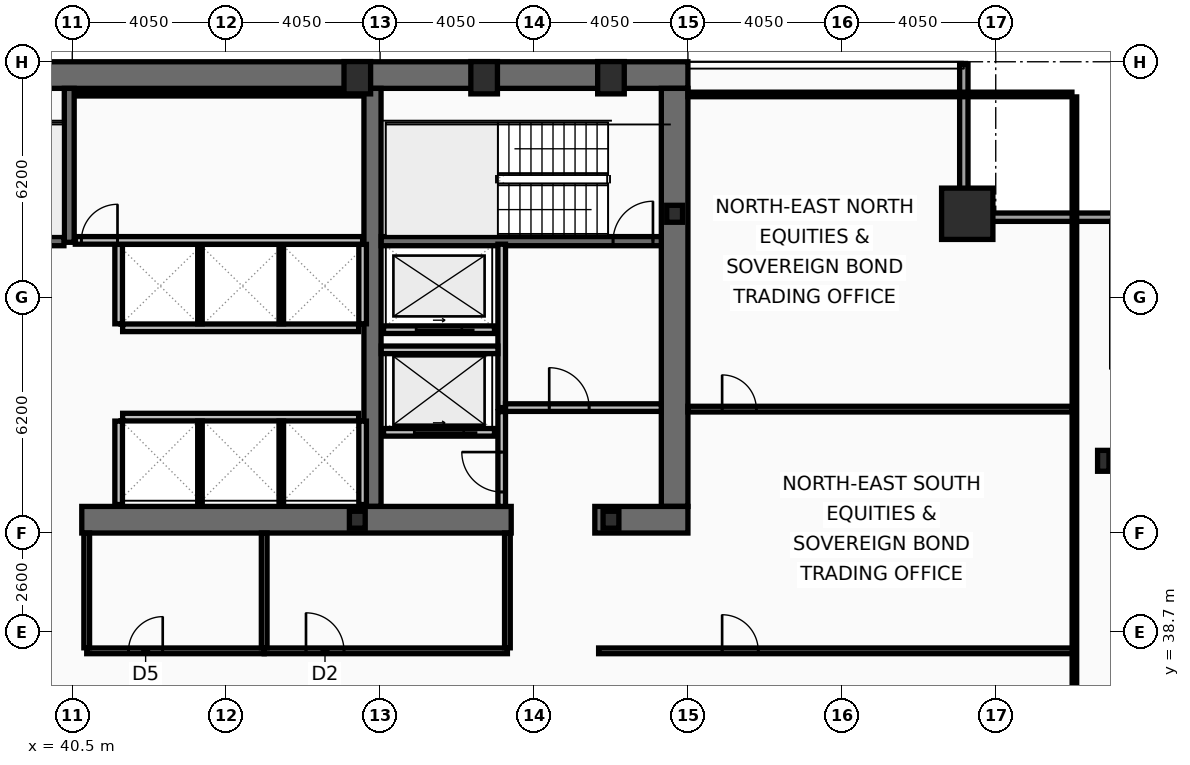
"""IFC4 building model, lengths in metres.
Left out: names, types, materials, properties, quantities, classifications, styles, units other than length and angle.
Written with IfcOpenShell. Run it as: python <this file> out.ifc"""

import sys

from ifc_helpers import new_model, si_unit, direction, frame, frame_2d, origin, origin_2d, place, context, subcontext, project, spatial, rectangle, hollow_rectangle, i_section, extrude, element, fill, save


model = new_model("IFC4")
c1 = context("Model", 3, precision=1e-05, world=origin(), true_north=direction((0.0, 1.0)))
c2 = subcontext(c1, "Body", "Model", "MODEL_VIEW")
j1 = project(units=[si_unit("LENGTHUNIT", "METRE"), si_unit("PLANEANGLEUNIT", "RADIAN")], contexts=[c1])
p1 = place(None, origin())
s1 = spatial("IfcSite", under=j1, at=p1, CompositionType="ELEMENT")
p2 = place(p1, origin())
s2 = spatial("IfcBuilding", under=s1, at=p2, CompositionType="ELEMENT")
p3 = place(p2, frame((0.0, 0.0, 157.8)))
s3 = spatial("IfcBuildingStorey", under=s2, at=p3, CompositionType="ELEMENT", Elevation=157.8)
p4 = place(p3, frame((16.2, 53.35, 0.0), z_axis=(0.0, 0.0, 1.0), x_axis=(1.0, 0.0, 0.0)))
e1 = element("IfcWall", 1, at=p4, inside=s3, PredefinedType="SHEAR", context=c2, shape_type="SweptSolid", body=[
    extrude(rectangle(XDim=40.5, YDim=0.7, at=frame_2d((20.25, 0.0))), origin(), (0.0, 0.0, 1.0), 3.44),
])
p5 = place(p3, frame((56.35, 53.0, 0.0), z_axis=(0.0, 0.0, 1.0), x_axis=(0.0, -1.0, 0.0)))
e2 = element("IfcWall", 2, at=p5, inside=s3, PredefinedType="SHEAR", context=c2, shape_type="SweptSolid", body=[
    extrude(rectangle(XDim=11.0, YDim=0.7, at=frame_2d((5.5, 0.0))), origin(), (0.0, 0.0, 1.0), 3.44),
])
p6 = place(p3, frame((48.4, 42.0, 0.0), z_axis=(0.0, 0.0, 1.0), x_axis=(0.0, 1.0, 0.0)))
e3 = element("IfcWall", 3, at=p6, inside=s3, PredefinedType="SHEAR", context=c2, shape_type="SweptSolid", body=[
    extrude(rectangle(XDim=11.0, YDim=0.45, at=frame_2d((5.5, 0.0))), origin(), (0.0, 0.0, 1.0), 3.44),
])
p7 = place(p3, frame((52.05, 41.65, 0.0), z_axis=(0.0, 0.0, 1.0), x_axis=(-1.0, 0.0, 0.0)))
e4 = element("IfcWall", 4, at=p7, inside=s3, PredefinedType="SHEAR", context=c2, shape_type="SweptSolid", body=[
    extrude(rectangle(XDim=11.3, YDim=0.7, at=frame_2d((5.65, 0.0))), origin(), (0.0, 0.0, 1.0), 3.44),
])
p8 = place(p3, frame((56.7, 41.65, 0.0), z_axis=(0.0, 0.0, 1.0), x_axis=(-1.0, 0.0, 0.0)))
e5 = element("IfcWall", 5, at=p8, inside=s3, PredefinedType="SHEAR", context=c2, shape_type="SweptSolid", body=[
    extrude(rectangle(XDim=2.45, YDim=0.7, at=frame_2d((1.225, 0.0))), origin(), (0.0, 0.0, 1.0), 3.44),
])
p9 = place(p3, frame((40.42, 48.95, 0.0), z_axis=(0.0, 0.0, 1.0), x_axis=(0.0, 1.0, 0.0)))
e6 = element("IfcWall", 6, at=p9, inside=s3, PredefinedType="SHEAR", context=c2, shape_type="SweptSolid", body=[
    extrude(rectangle(XDim=4.05, YDim=0.26, at=frame_2d((2.025, 0.0))), origin(), (0.0, 0.0, 1.0), 3.44),
])
p10 = place(p3, frame((48.63, 48.98, 0.0), z_axis=(0.0, 0.0, 1.0), x_axis=(1.0, 0.0, 0.0)))
e7 = element("IfcWall", 7, at=p10, inside=s3, PredefinedType="SHEAR", context=c2, shape_type="SweptSolid", body=[
    extrude(rectangle(XDim=7.37, YDim=0.24, at=frame_2d((3.685, 0.0))), origin(), (0.0, 0.0, 1.0), 3.44),
])
p11 = place(p10, frame((6.1, 0.0, 0.0)))
e8 = element("IfcOpeningElement", 8, at=p11, cuts=e7, PredefinedType="OPENING", context=c2, shape_type="SweptSolid", body=[
    extrude(rectangle(XDim=1.05, YDim=2.15, at=frame_2d((0.525, 1.075))), frame((0.0, 0.13, 0.0), z_axis=(0.0, -1.0, 0.0), x_axis=(1.0, 0.0, 0.0)), (0.0, 0.0, 1.0), 0.26),
])
p12 = place(p3, frame((32.72, 48.98, 0.0), z_axis=(0.0, 0.0, 1.0), x_axis=(1.0, 0.0, 0.0)))
e9 = element("IfcWall", 9, at=p12, inside=s3, PredefinedType="SHEAR", context=c2, shape_type="SweptSolid", body=[
    extrude(rectangle(XDim=7.56, YDim=0.24, at=frame_2d((3.78, 0.0))), origin(), (0.0, 0.0, 1.0), 3.44),
])
p13 = place(p12, frame((0.22, 0.0, 0.0)))
e10 = element("IfcOpeningElement", 10, at=p13, cuts=e9, PredefinedType="OPENING", context=c2, shape_type="SweptSolid", body=[
    extrude(rectangle(XDim=1.05, YDim=2.15, at=frame_2d((0.525, 1.075))), frame((0.0, 0.13, 0.0), z_axis=(0.0, -1.0, 0.0), x_axis=(1.0, 0.0, 0.0)), (0.0, 0.0, 1.0), 0.26),
])
p14 = place(p3, frame((64.05, 49.7, 0.0), z_axis=(0.0, 0.0, 1.0), x_axis=(1.0, 0.0, 0.0)))
e11 = element("IfcColumn", 11, at=p14, inside=s3, PredefinedType="COLUMN", context=c2, shape_type="SweptSolid", body=[
    extrude(hollow_rectangle(XDim=1.35, YDim=1.35, WallThickness=0.065, at=origin_2d()), origin(), (0.0, 0.0, 1.0), 3.6),
])
for number, where, z_axis, x_axis in (
    (12, (48.0, 53.28, 0.0), (0.0, 0.0, 1.0), (1.0, 0.0, 0.0)),
    (13, (51.337, 53.28, 0.0), (0.0, 0.0, 1.0), (1.0, 0.0, 0.0)),
    (14, (54.675, 53.28, 0.0), (0.0, 0.0, 1.0), (1.0, 0.0, 0.0)),
):
    element("IfcColumn", number, at=place(p3, frame(where, z_axis=z_axis, x_axis=x_axis)), inside=s3, PredefinedType="COLUMN", context=c2, shape_type="SweptSolid", body=[
        extrude(hollow_rectangle(XDim=0.7, YDim=0.85, WallThickness=0.05, at=origin_2d()), origin(), (0.0, 0.0, 1.0), 3.6),
    ])
p15 = place(p3, frame((67.63, 43.2, 0.0), z_axis=(0.0, 0.0, 1.0), x_axis=(1.0, 0.0, 0.0)))
e15 = element("IfcColumn", 15, at=p15, inside=s3, PredefinedType="COLUMN", context=c2, shape_type="SweptSolid", body=[
    extrude(i_section(OverallWidth=0.3, OverallDepth=0.55, WebThickness=0.015, FlangeThickness=0.029, at=origin_2d()), origin(), (0.0, 0.0, 1.0), 3.6),
])
for number, where, z_axis, x_axis in (
    (16, (56.35, 49.7, 0.0), (0.0, 0.0, 1.0), (1.0, 0.0, 0.0)),
    (17, (48.0, 41.65, 0.0), (0.0, 0.0, 1.0), (1.0, 0.0, 0.0)),
    (18, (54.675, 41.65, 0.0), (0.0, 0.0, 1.0), (1.0, 0.0, 0.0)),
):
    element("IfcColumn", number, at=place(p3, frame(where, z_axis=z_axis, x_axis=x_axis)), inside=s3, PredefinedType="COLUMN", context=c2, shape_type="SweptSolid", body=[
        extrude(i_section(OverallWidth=0.416, OverallDepth=0.446, WebThickness=0.039, FlangeThickness=0.063, at=origin_2d()), origin(), (0.0, 0.0, 1.0), 3.6),
    ])
p16 = place(p3, frame((63.96, 53.63, 0.0), z_axis=(0.0, 0.0, 1.0), x_axis=(0.0, -1.0, 0.0)))
e19 = element("IfcWall", 19, at=p16, inside=s3, PredefinedType="SOLIDWALL", context=c2, shape_type="SweptSolid", body=[
    extrude(rectangle(XDim=3.91, YDim=0.22, at=frame_2d((1.955, 0.0))), origin(), (0.0, 0.0, 1.0), 2.83),
])
p17 = place(p3, frame((63.85, 49.61, 0.0), z_axis=(0.0, 0.0, 1.0), x_axis=(1.0, 0.0, 0.0)))
e20 = element("IfcWall", 20, at=p17, inside=s3, PredefinedType="SOLIDWALL", context=c2, shape_type="SweptSolid", body=[
    extrude(rectangle(XDim=4.22, YDim=0.22, at=frame_2d((2.11, 0.0))), origin(), (0.0, 0.0, 1.0), 2.83),
])
p18 = place(p3, frame((51.61, 43.95, 0.0), z_axis=(0.0, 0.0, 1.0), x_axis=(-1.0, 0.0, 0.0)))
e21 = element("IfcWall", 21, at=p18, inside=s3, PredefinedType="PARTITIONING", context=c2, shape_type="SweptSolid", body=[
    extrude(rectangle(XDim=2.92, YDim=0.2, at=frame_2d((1.46, 0.0))), origin(), (0.0, 0.0, 1.0), 3.44),
])
p19 = place(p18, frame((0.81, 0.0, 0.0)))
e22 = element("IfcOpeningElement", 22, at=p19, cuts=e21, PredefinedType="OPENING", context=c2, shape_type="SweptSolid", body=[
    extrude(rectangle(XDim=1.3, YDim=2.18, at=frame_2d((0.65, 1.09))), frame((0.0, 0.11, 0.0), z_axis=(0.0, -1.0, 0.0), x_axis=(1.0, 0.0, 0.0)), (0.0, 0.0, 1.0), 0.22),
])
p20 = place(p3, frame((51.61, 46.65, 0.0), z_axis=(0.0, 0.0, 1.0), x_axis=(-1.0, 0.0, 0.0)))
e23 = element("IfcWall", 23, at=p20, inside=s3, PredefinedType="PARTITIONING", context=c2, shape_type="SweptSolid", body=[
    extrude(rectangle(XDim=2.92, YDim=0.2, at=frame_2d((1.46, 0.0))), origin(), (0.0, 0.0, 1.0), 3.44),
])
p21 = place(p20, frame((0.86, 0.0, 0.0)))
e24 = element("IfcOpeningElement", 24, at=p21, cuts=e23, PredefinedType="OPENING", context=c2, shape_type="SweptSolid", body=[
    extrude(rectangle(XDim=1.2, YDim=2.18, at=frame_2d((0.6, 1.09))), frame((0.0, 0.11, 0.0), z_axis=(0.0, -1.0, 0.0), x_axis=(1.0, 0.0, 0.0)), (0.0, 0.0, 1.0), 0.22),
])
p22 = place(p3, frame((51.8, 44.6, 0.0), z_axis=(0.0, 0.0, 1.0), x_axis=(0.0, 1.0, 0.0)))
e25 = element("IfcWall", 25, at=p22, inside=s3, PredefinedType="PARTITIONING", context=c2, shape_type="SweptSolid", body=[
    extrude(rectangle(XDim=4.3, YDim=0.2, at=frame_2d((2.15, 0.0))), origin(), (0.0, 0.0, 1.0), 3.44),
])
p23 = place(p3, frame((51.9, 44.6, 0.0), z_axis=(0.0, 0.0, 1.0), x_axis=(1.0, 0.0, 0.0)))
e26 = element("IfcWall", 26, at=p23, inside=s3, PredefinedType="PARTITIONING", context=c2, shape_type="SweptSolid", body=[
    extrude(rectangle(XDim=4.1, YDim=0.2, at=frame_2d((2.05, 0.0))), origin(), (0.0, 0.0, 1.0), 3.44),
])
p24 = place(p23, frame((1.15, 0.0, 0.0)))
e27 = element("IfcOpeningElement", 27, at=p24, cuts=e26, PredefinedType="OPENING", context=c2, shape_type="SweptSolid", body=[
    extrude(rectangle(XDim=1.05, YDim=2.15, at=frame_2d((0.525, 1.075))), frame((0.0, 0.11, 0.0), z_axis=(0.0, -1.0, 0.0), x_axis=(1.0, 0.0, 0.0)), (0.0, 0.0, 1.0), 0.22),
])
p25 = place(p3, frame((48.63, 46.12, 0.0), z_axis=(0.0, 0.0, 1.0), x_axis=(1.0, 0.0, 0.0)))
e28 = element("IfcWall", 28, at=p25, inside=s3, PredefinedType="PARTITIONING", context=c2, shape_type="SweptSolid", body=[
    extrude(rectangle(XDim=3.07, YDim=0.2, at=frame_2d((1.535, 0.0))), origin(), (0.0, 0.0, 1.0), 3.44),
])
p26 = place(p3, frame((51.8, 42.0, 0.0), z_axis=(0.0, 0.0, 1.0), x_axis=(0.0, 1.0, 0.0)))
e29 = element("IfcWall", 29, at=p26, inside=s3, PredefinedType="PARTITIONING", context=c2, shape_type="SweptSolid", body=[
    extrude(rectangle(XDim=2.495, YDim=0.2, at=frame_2d((1.248, 0.0))), origin(), (0.0, 0.0, 1.0), 3.44),
])
p27 = place(p26, frame((0.38, 0.0, 0.0)))
e30 = element("IfcOpeningElement", 30, at=p27, cuts=e29, PredefinedType="OPENING", context=c2, shape_type="SweptSolid", body=[
    extrude(rectangle(XDim=1.05, YDim=2.15, at=frame_2d((0.525, 1.075))), frame((0.0, 0.11, 0.0), z_axis=(0.0, -1.0, 0.0), x_axis=(1.0, 0.0, 0.0)), (0.0, 0.0, 1.0), 0.22),
])
p28 = place(p3, frame((41.825, 46.7, 0.0), z_axis=(0.0, 0.0, 1.0), x_axis=(1.0, 0.0, 0.0)))
e31 = element("IfcWall", 31, at=p28, inside=s3, PredefinedType="PARTITIONING", context=c2, shape_type="SweptSolid", body=[
    extrude(rectangle(XDim=6.21, YDim=0.2, at=frame_2d((3.105, 0.0))), origin(), (0.0, 0.0, 1.0), 3.44),
])
for number, where, z_axis, x_axis in (
    (32, (41.72, 46.805, 0.0), (0.0, 0.0, 1.0), (0.0, 1.0, 0.0)),
    (33, (48.14, 46.805, 0.0), (0.0, 0.0, 1.0), (0.0, 1.0, 0.0)),
):
    element("IfcWall", number, at=place(p3, frame(where, z_axis=z_axis, x_axis=x_axis)), inside=s3, PredefinedType="PARTITIONING", context=c2, shape_type="SweptSolid", body=[
        extrude(rectangle(XDim=2.09, YDim=0.2, at=frame_2d((1.045, 0.0))), origin(), (0.0, 0.0, 1.0), 3.44),
    ])
for number, where, z_axis, x_axis in (
    (34, (43.86, 46.805, 0.0), (0.0, 0.0, 1.0), (0.0, 1.0, 0.0)),
    (35, (46.0, 46.805, 0.0), (0.0, 0.0, 1.0), (0.0, 1.0, 0.0)),
):
    element("IfcWall", number, at=place(p3, frame(where, z_axis=z_axis, x_axis=x_axis)), inside=s3, PredefinedType="PARTITIONING", context=c2, shape_type="SweptSolid", body=[
        extrude(rectangle(XDim=2.09, YDim=0.12, at=frame_2d((1.045, 0.0))), origin(), (0.0, 0.0, 1.0), 3.44),
    ])
p29 = place(p3, frame((41.825, 44.35, 0.0), z_axis=(0.0, 0.0, 1.0), x_axis=(1.0, 0.0, 0.0)))
e36 = element("IfcWall", 36, at=p29, inside=s3, PredefinedType="PARTITIONING", context=c2, shape_type="SweptSolid", body=[
    extrude(rectangle(XDim=6.21, YDim=0.2, at=frame_2d((3.105, 0.0))), origin(), (0.0, 0.0, 1.0), 3.44),
])
for number, where, z_axis, x_axis in (
    (37, (41.72, 42.05, 0.0), (0.0, 0.0, 1.0), (0.0, 1.0, 0.0)),
    (38, (48.14, 42.05, 0.0), (0.0, 0.0, 1.0), (0.0, 1.0, 0.0)),
):
    element("IfcWall", number, at=place(p3, frame(where, z_axis=z_axis, x_axis=x_axis)), inside=s3, PredefinedType="PARTITIONING", context=c2, shape_type="SweptSolid", body=[
        extrude(rectangle(XDim=2.195, YDim=0.2, at=frame_2d((1.098, 0.0))), origin(), (0.0, 0.0, 1.0), 3.44),
    ])
for number, where, z_axis, x_axis in (
    (39, (43.86, 42.05, 0.0), (0.0, 0.0, 1.0), (0.0, 1.0, 0.0)),
    (40, (46.0, 42.05, 0.0), (0.0, 0.0, 1.0), (0.0, 1.0, 0.0)),
):
    element("IfcWall", number, at=place(p3, frame(where, z_axis=z_axis, x_axis=x_axis)), inside=s3, PredefinedType="PARTITIONING", context=c2, shape_type="SweptSolid", body=[
        extrude(rectangle(XDim=2.195, YDim=0.12, at=frame_2d((1.098, 0.0))), origin(), (0.0, 0.0, 1.0), 3.44),
    ])
p30 = place(p3, frame((40.58, 52.86, 0.0), z_axis=(0.0, 0.0, 1.0), x_axis=(1.0, 0.0, 0.0)))
e41 = element("IfcWall", 41, at=p30, inside=s3, PredefinedType="PARTITIONING", context=c2, shape_type="SweptSolid", body=[
    extrude(rectangle(XDim=7.56, YDim=0.12, at=frame_2d((3.78, 0.0))), origin(), (0.0, 0.0, 1.0), 3.44),
])
p31 = place(p3, frame((40.58, 49.0, 0.0), z_axis=(0.0, 0.0, 1.0), x_axis=(1.0, 0.0, 0.0)))
e42 = element("IfcWall", 42, at=p31, inside=s3, PredefinedType="PARTITIONING", context=c2, shape_type="SweptSolid", body=[
    extrude(rectangle(XDim=7.56, YDim=0.2, at=frame_2d((3.78, 0.0))), origin(), (0.0, 0.0, 1.0), 3.44),
])
p32 = place(p31, frame((0.16, 0.0, 0.0)))
e43 = element("IfcOpeningElement", 43, at=p32, cuts=e42, PredefinedType="OPENING", context=c2, shape_type="SweptSolid", body=[
    extrude(rectangle(XDim=0.95, YDim=2.1, at=frame_2d((0.475, 1.05))), frame((0.0, 0.11, 0.0), z_axis=(0.0, -1.0, 0.0), x_axis=(1.0, 0.0, 0.0)), (0.0, 0.0, 1.0), 0.22),
])
p33 = place(p3, frame((40.88, 38.2, 0.0), z_axis=(0.0, 0.0, 1.0), x_axis=(1.0, 0.0, 0.0)))
e44 = element("IfcWall", 44, at=p33, inside=s3, PredefinedType="PARTITIONING", context=c2, shape_type="SweptSolid", body=[
    extrude(rectangle(XDim=4.67, YDim=0.15, at=frame_2d((2.335, 0.0))), origin(), (0.0, 0.0, 1.0), 2.73),
])
p34 = place(p33, frame((1.1, 0.0, 0.0)))
e45 = element("IfcOpeningElement", 45, at=p34, cuts=e44, PredefinedType="OPENING", context=c2, shape_type="SweptSolid", body=[
    extrude(rectangle(XDim=0.9, YDim=2.05, at=frame_2d((0.45, 1.025))), frame((0.0, 0.085, 0.0), z_axis=(0.0, -1.0, 0.0), x_axis=(1.0, 0.0, 0.0)), (0.0, 0.0, 1.0), 0.17),
])
p35 = place(p3, frame((45.55, 38.2, 0.0), z_axis=(0.0, 0.0, 1.0), x_axis=(1.0, 0.0, 0.0)))
e46 = element("IfcWall", 46, at=p35, inside=s3, PredefinedType="PARTITIONING", context=c2, shape_type="SweptSolid", body=[
    extrude(rectangle(XDim=6.4, YDim=0.15, at=frame_2d((3.2, 0.0))), origin(), (0.0, 0.0, 1.0), 2.73),
])
p36 = place(p35, frame((1.1, 0.0, 0.0)))
e47 = element("IfcOpeningElement", 47, at=p36, cuts=e46, PredefinedType="OPENING", context=c2, shape_type="SweptSolid", body=[
    extrude(rectangle(XDim=1.0, YDim=2.05, at=frame_2d((0.5, 1.025))), frame((0.0, 0.085, 0.0), z_axis=(0.0, -1.0, 0.0), x_axis=(1.0, 0.0, 0.0)), (0.0, 0.0, 1.0), 0.17),
])
for number, where, z_axis, x_axis in (
    (48, (40.88, 38.28, 0.0), (0.0, 0.0, 1.0), (0.0, 1.0, 0.0)),
    (49, (45.55, 38.28, 0.0), (0.0, 0.0, 1.0), (0.0, 1.0, 0.0)),
    (50, (51.95, 38.28, 0.0), (0.0, 0.0, 1.0), (0.0, 1.0, 0.0)),
):
    element("IfcWall", number, at=place(p3, frame(where, z_axis=z_axis, x_axis=x_axis)), inside=s3, PredefinedType="PARTITIONING", context=c2, shape_type="SweptSolid", body=[
        extrude(rectangle(XDim=3.02, YDim=0.15, at=frame_2d((1.51, 0.0))), origin(), (0.0, 0.0, 1.0), 3.44),
    ])
p37 = place(p3, frame((54.35, 38.2, 0.0), z_axis=(0.0, 0.0, 1.0), x_axis=(1.0, 0.0, 0.0)))
e51 = element("IfcWall", 51, at=p37, inside=s3, PredefinedType="PARTITIONING", context=c2, shape_type="SweptSolid", body=[
    extrude(rectangle(XDim=12.52, YDim=0.15, at=frame_2d((6.26, 0.0))), origin(), (0.0, 0.0, 1.0), 2.73),
])
p38 = place(p37, frame((3.25, 0.0, 0.0)))
e52 = element("IfcOpeningElement", 52, at=p38, cuts=e51, PredefinedType="OPENING", context=c2, shape_type="SweptSolid", body=[
    extrude(rectangle(XDim=0.95, YDim=2.05, at=frame_2d((0.475, 1.025))), frame((0.0, 0.085, 0.0), z_axis=(0.0, -1.0, 0.0), x_axis=(1.0, 0.0, 0.0)), (0.0, 0.0, 1.0), 0.17),
])
p39 = place(p3, frame((56.7, 44.56, 0.0), z_axis=(0.0, 0.0, 1.0), x_axis=(1.0, 0.0, 0.0)))
e53 = element("IfcWall", 53, at=p39, inside=s3, PredefinedType="PARTITIONING", context=c2, shape_type="SweptSolid", body=[
    extrude(rectangle(XDim=10.105, YDim=0.15, at=frame_2d((5.052, 0.0))), origin(), (0.0, 0.0, 1.0), 2.83),
])
p40 = place(p39, frame((0.9, 0.0, 0.0)))
e54 = element("IfcOpeningElement", 54, at=p40, cuts=e53, PredefinedType="OPENING", context=c2, shape_type="SweptSolid", body=[
    extrude(rectangle(XDim=0.9, YDim=2.05, at=frame_2d((0.45, 1.025))), frame((0.0, 0.085, 0.0), z_axis=(0.0, -1.0, 0.0), x_axis=(1.0, 0.0, 0.0)), (0.0, 0.0, 1.0), 0.17),
])
p41 = place(p3, frame((66.87, 10.665, 0.0), z_axis=(0.0, 0.0, 1.0), x_axis=(0.0, 1.0, 0.0)))
e55 = element("IfcWall", 55, at=p41, inside=s3, PredefinedType="PARTITIONING", context=c2, shape_type="SweptSolid", body=[
    extrude(rectangle(XDim=42.11, YDim=0.12, at=frame_2d((21.055, 0.0))), origin(), (0.0, 0.0, 1.0), 2.73),
])
p42 = place(p3, frame((56.7, 52.84, 0.0), z_axis=(0.0, 0.0, 1.0), x_axis=(1.0, 0.0, 0.0)))
e56 = element("IfcWall", 56, at=p42, inside=s3, PredefinedType="PARTITIONING", context=c2, shape_type="SweptSolid", body=[
    extrude(rectangle(XDim=10.105, YDim=0.12, at=frame_2d((5.052, 0.0))), origin(), (0.0, 0.0, 1.0), 3.44),
])
p43 = place(p11, origin())
e57 = element("IfcDoor", 57, at=p43, inside=s3, OperationType="SINGLE_SWING_RIGHT", PredefinedType="DOOR", context=c2, shape_type="SweptSolid", body=[
    extrude(rectangle(XDim=1.05, YDim=2.15, at=frame_2d((0.525, 1.075))), frame((0.0, 0.025, 0.0), z_axis=(0.0, -1.0, 0.0), x_axis=(1.0, 0.0, 0.0)), (0.0, 0.0, 1.0), 0.05),
])
fill(e8, e57)
p44 = place(p19, origin())
e58 = element("IfcDoor", 58, at=p44, inside=s3, OperationType="SLIDING_TO_LEFT", PredefinedType="DOOR", context=c2, shape_type="SweptSolid", body=[
    extrude(rectangle(XDim=1.3, YDim=2.18, at=frame_2d((0.65, 1.09))), frame((0.0, 0.025, 0.0), z_axis=(0.0, -1.0, 0.0), x_axis=(1.0, 0.0, 0.0)), (0.0, 0.0, 1.0), 0.05),
])
fill(e22, e58)
p45 = place(p21, origin())
e59 = element("IfcDoor", 59, at=p45, inside=s3, OperationType="SLIDING_TO_LEFT", PredefinedType="DOOR", context=c2, shape_type="SweptSolid", body=[
    extrude(rectangle(XDim=1.2, YDim=2.18, at=frame_2d((0.6, 1.09))), frame((0.0, 0.025, 0.0), z_axis=(0.0, -1.0, 0.0), x_axis=(1.0, 0.0, 0.0)), (0.0, 0.0, 1.0), 0.05),
])
fill(e24, e59)
p46 = place(p24, origin())
e60 = element("IfcDoor", 60, at=p46, inside=s3, OperationType="SINGLE_SWING_LEFT", PredefinedType="DOOR", context=c2, shape_type="SweptSolid", body=[
    extrude(rectangle(XDim=1.05, YDim=2.15, at=frame_2d((0.525, 1.075))), frame((0.0, 0.025, 0.0), z_axis=(0.0, -1.0, 0.0), x_axis=(1.0, 0.0, 0.0)), (0.0, 0.0, 1.0), 0.05),
])
fill(e27, e60)
p47 = place(p27, origin())
e61 = element("IfcDoor", 61, at=p47, inside=s3, OperationType="SINGLE_SWING_RIGHT", PredefinedType="DOOR", context=c2, shape_type="SweptSolid", body=[
    extrude(rectangle(XDim=1.05, YDim=2.15, at=frame_2d((0.525, 1.075))), frame((0.0, 0.025, 0.0), z_axis=(0.0, -1.0, 0.0), x_axis=(1.0, 0.0, 0.0)), (0.0, 0.0, 1.0), 0.05),
])
fill(e30, e61)
p48 = place(p32, origin())
e62 = element("IfcDoor", 62, at=p48, inside=s3, OperationType="SINGLE_SWING_RIGHT", PredefinedType="DOOR", context=c2, shape_type="SweptSolid", body=[
    extrude(rectangle(XDim=0.95, YDim=2.1, at=frame_2d((0.475, 1.05))), frame((0.0, 0.025, 0.0), z_axis=(0.0, -1.0, 0.0), x_axis=(1.0, 0.0, 0.0)), (0.0, 0.0, 1.0), 0.05),
])
fill(e43, e62)
p49 = place(p34, origin())
e63 = element("IfcDoor", 63, at=p49, inside=s3, OperationType="SINGLE_SWING_RIGHT", PredefinedType="DOOR", context=c2, shape_type="SweptSolid", body=[
    extrude(rectangle(XDim=0.9, YDim=2.05, at=frame_2d((0.45, 1.025))), frame((0.0, 0.025, 0.0), z_axis=(0.0, -1.0, 0.0), x_axis=(1.0, 0.0, 0.0)), (0.0, 0.0, 1.0), 0.05),
])
fill(e45, e63)
p50 = place(p36, origin())
e64 = element("IfcDoor", 64, at=p50, inside=s3, OperationType="SINGLE_SWING_LEFT", PredefinedType="DOOR", context=c2, shape_type="SweptSolid", body=[
    extrude(rectangle(XDim=1.0, YDim=2.05, at=frame_2d((0.5, 1.025))), frame((0.0, 0.025, 0.0), z_axis=(0.0, -1.0, 0.0), x_axis=(1.0, 0.0, 0.0)), (0.0, 0.0, 1.0), 0.05),
])
fill(e47, e64)
p51 = place(p38, origin())
e65 = element("IfcDoor", 65, at=p51, inside=s3, OperationType="SINGLE_SWING_LEFT", PredefinedType="DOOR", context=c2, shape_type="SweptSolid", body=[
    extrude(rectangle(XDim=0.95, YDim=2.05, at=frame_2d((0.475, 1.025))), frame((0.0, 0.025, 0.0), z_axis=(0.0, -1.0, 0.0), x_axis=(1.0, 0.0, 0.0)), (0.0, 0.0, 1.0), 0.05),
])
fill(e52, e65)
p52 = place(p40, origin())
e66 = element("IfcDoor", 66, at=p52, inside=s3, OperationType="SINGLE_SWING_LEFT", PredefinedType="DOOR", context=c2, shape_type="SweptSolid", body=[
    extrude(rectangle(XDim=0.9, YDim=2.05, at=frame_2d((0.45, 1.025))), frame((0.0, 0.025, 0.0), z_axis=(0.0, -1.0, 0.0), x_axis=(1.0, 0.0, 0.0)), (0.0, 0.0, 1.0), 0.05),
])
fill(e54, e66)
save(model, sys.argv[1])
